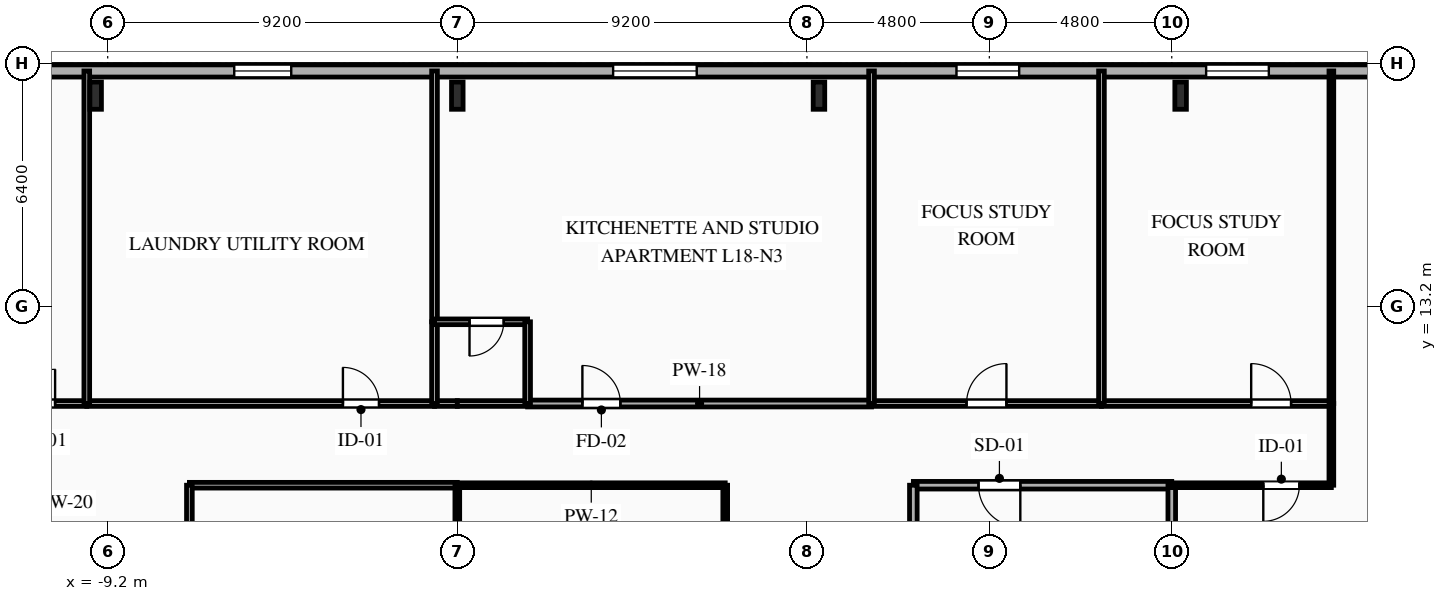
"""IFC4 building model, lengths in metres.
Left out: names, types, materials, properties, quantities, classifications, styles, units other than length and angle.
Written with IfcOpenShell. Run it as: python <this file> out.ifc"""

import sys

from ifc_helpers import new_model, si_unit, direction, frame, frame_2d, origin, origin_2d, place, context, subcontext, project, spatial, rectangle, i_section, extrude, element, fill, save


model = new_model("IFC4")
c1 = context("Model", 3, precision=1e-05, world=origin(), true_north=direction((0.0, 1.0)))
c2 = subcontext(c1, "Body", "Model", "MODEL_VIEW")
j1 = project(units=[si_unit("LENGTHUNIT", "METRE"), si_unit("PLANEANGLEUNIT", "RADIAN")], contexts=[c1])
p1 = place(None, origin())
s1 = spatial("IfcSite", under=j1, at=p1, CompositionType="ELEMENT")
p2 = place(p1, origin())
s2 = spatial("IfcBuilding", under=s1, at=p2, CompositionType="ELEMENT")
p3 = place(p2, frame((0.0, 0.0, 67.2)))
s3 = spatial("IfcBuildingStorey", under=s2, at=p3, CompositionType="ELEMENT", Elevation=67.2)
for number, where, z_axis, x_axis in (
    (1, (19.033, 18.75, 0.0), (0.0, 0.0, 1.0), (1.0, 0.0, 0.0)),
    (2, (9.517, 18.75, 0.0), (0.0, 0.0, 1.0), (1.0, 0.0, 0.0)),
    (3, (0.0, 18.75, 0.0), (0.0, 0.0, 1.0), (1.0, 0.0, 0.0)),
    (4, (-9.517, 18.75, 0.0), (0.0, 0.0, 1.0), (1.0, 0.0, 0.0)),
):
    element("IfcColumn", number, at=place(p3, frame(where, z_axis=z_axis, x_axis=x_axis)), inside=s3, PredefinedType="COLUMN", context=c2, shape_type="SweptSolid", body=[
        extrude(i_section(OverallWidth=0.304, OverallDepth=0.716, WebThickness=0.021, FlangeThickness=0.04, FilletRadius=0.027, at=origin_2d()), origin(), (0.0, 0.0, 1.0), 3.35),
    ])
p4 = place(p3, frame((-29.2, 19.4, 0.0), z_axis=(0.0, 0.0, 1.0), x_axis=(1.0, 0.0, 0.0)))
e5 = element("IfcWall", 5, at=p4, inside=s3, PredefinedType="SOLIDWALL", context=c2, shape_type="SweptSolid", body=[
    extrude(rectangle(XDim=58.4, YDim=0.32, at=frame_2d((29.2, 0.0))), origin(), (0.0, 0.0, 1.0), 3.035),
])
p5 = place(p4, frame((1.255, 0.0, 0.85)))
e6 = element("IfcOpeningElement", 6, at=p5, cuts=e5, PredefinedType="OPENING", context=c2, shape_type="SweptSolid", body=[
    extrude(rectangle(XDim=1.65, YDim=1.85, at=frame_2d((0.825, 0.925))), frame((0.0, 0.17, 0.0), z_axis=(0.0, -1.0, 0.0), x_axis=(1.0, 0.0, 0.0)), (0.0, 0.0, 1.0), 0.34),
])
p6 = place(p4, frame((4.26, 0.0, 0.85)))
e7 = element("IfcOpeningElement", 7, at=p6, cuts=e5, PredefinedType="OPENING", context=c2, shape_type="SweptSolid", body=[
    extrude(rectangle(XDim=1.4, YDim=1.85, at=frame_2d((0.7, 0.925))), frame((0.0, 0.17, 0.0), z_axis=(0.0, -1.0, 0.0), x_axis=(1.0, 0.0, 0.0)), (0.0, 0.0, 1.0), 0.34),
])
p7 = place(p4, frame((8.135, 0.0, 0.85)))
e8 = element("IfcOpeningElement", 8, at=p7, cuts=e5, PredefinedType="OPENING", context=c2, shape_type="SweptSolid", body=[
    extrude(rectangle(XDim=1.65, YDim=1.85, at=frame_2d((0.825, 0.925))), frame((0.0, 0.17, 0.0), z_axis=(0.0, -1.0, 0.0), x_axis=(1.0, 0.0, 0.0)), (0.0, 0.0, 1.0), 0.34),
])
p8 = place(p4, frame((13.575, 0.0, 0.85)))
e9 = element("IfcOpeningElement", 9, at=p8, cuts=e5, PredefinedType="OPENING", context=c2, shape_type="SweptSolid", body=[
    extrude(rectangle(XDim=1.65, YDim=1.85, at=frame_2d((0.825, 0.925))), frame((0.0, 0.17, 0.0), z_axis=(0.0, -1.0, 0.0), x_axis=(1.0, 0.0, 0.0)), (0.0, 0.0, 1.0), 0.34),
])
p9 = place(p4, frame((23.33, 0.0, 0.85)))
e10 = element("IfcOpeningElement", 10, at=p9, cuts=e5, PredefinedType="OPENING", context=c2, shape_type="SweptSolid", body=[
    extrude(rectangle(XDim=1.5, YDim=1.85, at=frame_2d((0.75, 0.925))), frame((0.0, 0.17, 0.0), z_axis=(0.0, -1.0, 0.0), x_axis=(1.0, 0.0, 0.0)), (0.0, 0.0, 1.0), 0.34),
])
p10 = place(p4, frame((33.3, 0.0, 0.85)))
e11 = element("IfcOpeningElement", 11, at=p10, cuts=e5, PredefinedType="OPENING", context=c2, shape_type="SweptSolid", body=[
    extrude(rectangle(XDim=2.2, YDim=1.85, at=frame_2d((1.1, 0.925))), frame((0.0, 0.17, 0.0), z_axis=(0.0, -1.0, 0.0), x_axis=(1.0, 0.0, 0.0)), (0.0, 0.0, 1.0), 0.34),
])
p11 = place(p4, frame((42.335, 0.0, 0.85)))
e12 = element("IfcOpeningElement", 12, at=p11, cuts=e5, PredefinedType="OPENING", context=c2, shape_type="SweptSolid", body=[
    extrude(rectangle(XDim=1.65, YDim=1.85, at=frame_2d((0.825, 0.925))), frame((0.0, 0.17, 0.0), z_axis=(0.0, -1.0, 0.0), x_axis=(1.0, 0.0, 0.0)), (0.0, 0.0, 1.0), 0.34),
])
p12 = place(p4, frame((48.905, 0.0, 0.85)))
e13 = element("IfcOpeningElement", 13, at=p12, cuts=e5, PredefinedType="OPENING", context=c2, shape_type="SweptSolid", body=[
    extrude(rectangle(XDim=1.65, YDim=1.85, at=frame_2d((0.825, 0.925))), frame((0.0, 0.17, 0.0), z_axis=(0.0, -1.0, 0.0), x_axis=(1.0, 0.0, 0.0)), (0.0, 0.0, 1.0), 0.34),
])
p13 = place(p4, frame((54.37, 0.0, 0.85)))
e14 = element("IfcOpeningElement", 14, at=p13, cuts=e5, PredefinedType="OPENING", context=c2, shape_type="SweptSolid", body=[
    extrude(rectangle(XDim=1.5, YDim=1.85, at=frame_2d((0.75, 0.925))), frame((0.0, 0.17, 0.0), z_axis=(0.0, -1.0, 0.0), x_axis=(1.0, 0.0, 0.0)), (0.0, 0.0, 1.0), 0.34),
])
p14 = place(p3, frame((18.8, 8.5, 0.0), z_axis=(0.0, 0.0, 1.0), x_axis=(-1.0, 0.0, 0.0)))
e15 = element("IfcWall", 15, at=p14, inside=s3, PredefinedType="PARTITIONING", context=c2, shape_type="SweptSolid", body=[
    extrude(rectangle(XDim=6.8, YDim=0.2, at=frame_2d((3.4, 0.0))), origin(), (0.0, 0.0, 1.0), 3.035),
])
p15 = place(p14, frame((3.985, 0.0, 0.0)))
e16 = element("IfcOpeningElement", 16, at=p15, cuts=e15, PredefinedType="OPENING", context=c2, shape_type="SweptSolid", body=[
    extrude(rectangle(XDim=1.1, YDim=2.15, at=frame_2d((0.55, 1.075))), frame((0.0, 0.11, 0.0), z_axis=(0.0, -1.0, 0.0), x_axis=(1.0, 0.0, 0.0)), (0.0, 0.0, 1.0), 0.22),
])
p16 = place(p3, frame((12.0, 8.5, 0.0), z_axis=(0.0, 0.0, 1.0), x_axis=(0.0, -1.0, 0.0)))
e17 = element("IfcWall", 17, at=p16, inside=s3, PredefinedType="PARTITIONING", context=c2, shape_type="SweptSolid", body=[
    extrude(rectangle(XDim=2.9, YDim=0.2, at=frame_2d((1.45, 0.0))), origin(), (0.0, 0.0, 1.0), 3.035),
])
p17 = place(p3, frame((18.8, 5.6, 0.0), z_axis=(0.0, 0.0, 1.0), x_axis=(0.0, 1.0, 0.0)))
e18 = element("IfcWall", 18, at=p17, inside=s3, PredefinedType="PARTITIONING", context=c2, shape_type="SweptSolid", body=[
    extrude(rectangle(XDim=2.9, YDim=0.2, at=frame_2d((1.45, 0.0))), origin(), (0.0, 0.0, 1.0), 2.52),
])
p18 = place(p3, frame((-12.1, 10.65, 0.0), z_axis=(0.0, 0.0, 1.0), x_axis=(1.0, 0.0, 0.0)))
e19 = element("IfcWall", 19, at=p18, inside=s3, PredefinedType="PLUMBINGWALL", context=c2, shape_type="SweptSolid", body=[
    extrude(rectangle(XDim=2.35, YDim=0.15, at=frame_2d((1.175, 0.0))), origin(), (0.0, 0.0, 1.0), 3.035),
])
p19 = place(p18, frame((0.616, 0.0, 0.0)))
e20 = element("IfcOpeningElement", 20, at=p19, cuts=e19, PredefinedType="OPENING", context=c2, shape_type="SweptSolid", body=[
    extrude(rectangle(XDim=0.9, YDim=2.1, at=frame_2d((0.45, 1.05))), frame((0.0, 0.085, 0.0), z_axis=(0.0, -1.0, 0.0), x_axis=(1.0, 0.0, 0.0)), (0.0, 0.0, 1.0), 0.17),
])
p20 = place(p3, frame((-9.75, 10.65, 0.0), z_axis=(0.0, 0.0, 1.0), x_axis=(1.0, 0.0, 0.0)))
e21 = element("IfcWall", 21, at=p20, inside=s3, PredefinedType="PARTITIONING", context=c2, shape_type="SweptSolid", body=[
    extrude(rectangle(XDim=9.15, YDim=0.15, at=frame_2d((4.575, 0.0))), origin(), (0.0, 0.0, 1.0), 3.035),
])
p21 = place(p20, frame((6.74, 0.0, 0.0)))
e22 = element("IfcOpeningElement", 22, at=p21, cuts=e21, PredefinedType="OPENING", context=c2, shape_type="SweptSolid", body=[
    extrude(rectangle(XDim=0.95, YDim=2.1, at=frame_2d((0.475, 1.05))), frame((0.0, 0.085, 0.0), z_axis=(0.0, -1.0, 0.0), x_axis=(1.0, 0.0, 0.0)), (0.0, 0.0, 1.0), 0.17),
])
p22 = place(p3, frame((-0.6, 10.65, 0.0), z_axis=(0.0, 0.0, 1.0), x_axis=(1.0, 0.0, 0.0)))
e23 = element("IfcWall", 23, at=p22, inside=s3, PredefinedType="PLUMBINGWALL", context=c2, shape_type="SweptSolid", body=[
    extrude(rectangle(XDim=0.6, YDim=0.15, at=frame_2d((0.3, 0.0))), origin(), (0.0, 0.0, 1.0), 3.035),
])
p23 = place(p3, frame((0.0, 8.5, 0.0), z_axis=(0.0, 0.0, 1.0), x_axis=(-1.0, 0.0, 0.0)))
e24 = element("IfcWall", 24, at=p23, inside=s3, PredefinedType="PARTITIONING", context=c2, shape_type="SweptSolid", body=[
    extrude(rectangle(XDim=7.05, YDim=0.15, at=frame_2d((3.525, 0.0))), origin(), (0.0, 0.0, 1.0), 3.035),
])
p24 = place(p3, frame((23.0, 8.5, 0.0), z_axis=(0.0, 0.0, 1.0), x_axis=(-1.0, 0.0, 0.0)))
e25 = element("IfcWall", 25, at=p24, inside=s3, PredefinedType="PARTITIONING", context=c2, shape_type="SweptSolid", body=[
    extrude(rectangle(XDim=4.2, YDim=0.125, at=frame_2d((2.1, 0.0))), origin(), (0.0, 0.0, 1.0), 3.035),
])
p25 = place(p24, frame((0.841, 0.0, 0.0)))
e26 = element("IfcOpeningElement", 26, at=p25, cuts=e25, PredefinedType="OPENING", context=c2, shape_type="SweptSolid", body=[
    extrude(rectangle(XDim=0.95, YDim=2.1, at=frame_2d((0.475, 1.05))), frame((0.0, 0.073, 0.0), z_axis=(0.0, -1.0, 0.0), x_axis=(1.0, 0.0, 0.0)), (0.0, 0.0, 1.0), 0.145),
])
p26 = place(p3, frame((23.0, 10.65, 0.0), z_axis=(0.0, 0.0, 1.0), x_axis=(0.0, -1.0, 0.0)))
e27 = element("IfcWall", 27, at=p26, inside=s3, PredefinedType="PARTITIONING", context=c2, shape_type="SweptSolid", body=[
    extrude(rectangle(XDim=2.15, YDim=0.125, at=frame_2d((1.075, 0.0))), origin(), (0.0, 0.0, 1.0), 3.035),
])
p27 = place(p3, frame((1.85, 10.65, 0.0), z_axis=(0.0, 0.0, 1.0), x_axis=(1.0, 0.0, 0.0)))
e28 = element("IfcWall", 28, at=p27, inside=s3, PredefinedType="PARTITIONING", context=c2, shape_type="SweptSolid", body=[
    extrude(rectangle(XDim=9.05, YDim=0.18, at=frame_2d((4.525, 0.0))), origin(), (0.0, 0.0, 1.0), 3.035),
])
p28 = place(p27, frame((1.441, 0.0, 0.0)))
e29 = element("IfcOpeningElement", 29, at=p28, cuts=e28, PredefinedType="OPENING", context=c2, shape_type="SweptSolid", body=[
    extrude(rectangle(XDim=1.0, YDim=2.15, at=frame_2d((0.5, 1.075))), frame((0.0, 0.1, 0.0), z_axis=(0.0, -1.0, 0.0), x_axis=(1.0, 0.0, 0.0)), (0.0, 0.0, 1.0), 0.2),
])
p29 = place(p3, frame((0.0, 10.65, 0.0), z_axis=(0.0, 0.0, 1.0), x_axis=(1.0, 0.0, 0.0)))
e30 = element("IfcWall", 30, at=p29, inside=s3, PredefinedType="PLUMBINGWALL", context=c2, shape_type="SweptSolid", body=[
    extrude(rectangle(XDim=1.85, YDim=0.15, at=frame_2d((0.925, 0.0))), origin(), (0.0, 0.0, 1.0), 3.035),
])
p30 = place(p3, frame((10.9, 10.65, 0.0), z_axis=(0.0, 0.0, 1.0), x_axis=(1.0, 0.0, 0.0)))
e31 = element("IfcWall", 31, at=p30, inside=s3, PredefinedType="PARTITIONING", context=c2, shape_type="SweptSolid", body=[
    extrude(rectangle(XDim=6.05, YDim=0.15, at=frame_2d((3.025, 0.0))), origin(), (0.0, 0.0, 1.0), 3.035),
])
p31 = place(p30, frame((2.5, 0.0, 0.0)))
e32 = element("IfcOpeningElement", 32, at=p31, cuts=e31, PredefinedType="OPENING", context=c2, shape_type="SweptSolid", body=[
    extrude(rectangle(XDim=1.05, YDim=2.15, at=frame_2d((0.525, 1.075))), frame((0.0, 0.085, 0.0), z_axis=(0.0, -1.0, 0.0), x_axis=(1.0, 0.0, 0.0)), (0.0, 0.0, 1.0), 0.17),
])
p32 = place(p3, frame((16.95, 10.65, 0.0), z_axis=(0.0, 0.0, 1.0), x_axis=(1.0, 0.0, 0.0)))
e33 = element("IfcWall", 33, at=p32, inside=s3, PredefinedType="PARTITIONING", context=c2, shape_type="SweptSolid", body=[
    extrude(rectangle(XDim=6.05, YDim=0.15, at=frame_2d((3.025, 0.0))), origin(), (0.0, 0.0, 1.0), 3.035),
])
p33 = place(p32, frame((3.94, 0.0, 0.0)))
e34 = element("IfcOpeningElement", 34, at=p33, cuts=e33, PredefinedType="OPENING", context=c2, shape_type="SweptSolid", body=[
    extrude(rectangle(XDim=1.05, YDim=2.15, at=frame_2d((0.525, 1.075))), frame((0.0, 0.085, 0.0), z_axis=(0.0, -1.0, 0.0), x_axis=(1.0, 0.0, 0.0)), (0.0, 0.0, 1.0), 0.17),
])
p34 = place(p3, frame((7.05, 8.5, 0.0), z_axis=(0.0, 0.0, 1.0), x_axis=(-1.0, 0.0, 0.0)))
e35 = element("IfcWall", 35, at=p34, inside=s3, PredefinedType="PARTITIONING", context=c2, shape_type="SweptSolid", body=[
    extrude(rectangle(XDim=7.05, YDim=0.125, at=frame_2d((3.525, 0.0))), origin(), (0.0, 0.0, 1.0), 3.035),
])
p35 = place(p3, frame((-7.05, 8.5, 0.0), z_axis=(0.0, 0.0, 1.0), x_axis=(0.0, -1.0, 0.0)))
e36 = element("IfcWall", 36, at=p35, inside=s3, PredefinedType="PARTITIONING", context=c2, shape_type="SweptSolid", body=[
    extrude(rectangle(XDim=14.1, YDim=0.15, at=frame_2d((7.05, 0.0))), origin(), (0.0, 0.0, 1.0), 3.035),
])
p36 = place(p35, frame((8.074, 0.0, 0.0)))
e37 = element("IfcOpeningElement", 37, at=p36, cuts=e36, PredefinedType="OPENING", context=c2, shape_type="SweptSolid", body=[
    extrude(rectangle(XDim=0.95, YDim=2.1, at=frame_2d((0.475, 1.05))), frame((0.0, 0.085, 0.0), z_axis=(0.0, -1.0, 0.0), x_axis=(1.0, 0.0, 0.0)), (0.0, 0.0, 1.0), 0.17),
])
p37 = place(p3, frame((7.05, -5.6, 0.0), z_axis=(0.0, 0.0, 1.0), x_axis=(0.0, 1.0, 0.0)))
e38 = element("IfcWall", 38, at=p37, inside=s3, PredefinedType="PARTITIONING", context=c2, shape_type="SweptSolid", body=[
    extrude(rectangle(XDim=14.1, YDim=0.125, at=frame_2d((7.05, 0.0))), origin(), (0.0, 0.0, 1.0), 3.035),
])
p38 = place(p37, frame((5.076, 0.0, 0.0)))
e39 = element("IfcOpeningElement", 39, at=p38, cuts=e38, PredefinedType="OPENING", context=c2, shape_type="SweptSolid", body=[
    extrude(rectangle(XDim=0.95, YDim=2.1, at=frame_2d((0.475, 1.05))), frame((0.0, 0.073, 0.0), z_axis=(0.0, -1.0, 0.0), x_axis=(1.0, 0.0, 0.0)), (0.0, 0.0, 1.0), 0.145),
])
p39 = place(p3, frame((23.0, 10.65, 0.0), z_axis=(0.0, 0.0, 1.0), x_axis=(0.0, 1.0, 0.0)))
e40 = element("IfcWall", 40, at=p39, inside=s3, PredefinedType="PARTITIONING", context=c2, shape_type="SweptSolid", body=[
    extrude(rectangle(XDim=8.75, YDim=0.125, at=frame_2d((4.375, 0.0))), origin(), (0.0, 0.0, 1.0), 3.035),
])
p40 = place(p3, frame((-9.75, 19.4, 0.0), z_axis=(0.0, 0.0, 1.0), x_axis=(0.0, -1.0, 0.0)))
e41 = element("IfcWall", 41, at=p40, inside=s3, PredefinedType="PLUMBINGWALL", context=c2, shape_type="SweptSolid", body=[
    extrude(rectangle(XDim=8.75, YDim=0.15, at=frame_2d((4.375, 0.0))), origin(), (0.0, 0.0, 1.0), 3.035),
])
p41 = place(p3, frame((-0.6, 19.4, 0.0), z_axis=(0.0, 0.0, 1.0), x_axis=(0.0, -1.0, 0.0)))
e42 = element("IfcWall", 42, at=p41, inside=s3, PredefinedType="PARTITIONING", context=c2, shape_type="SweptSolid", body=[
    extrude(rectangle(XDim=6.6, YDim=0.15, at=frame_2d((3.3, 0.0))), origin(), (0.0, 0.0, 1.0), 3.035),
])
p42 = place(p3, frame((-0.6, 12.8, 0.0), z_axis=(0.0, 0.0, 1.0), x_axis=(0.0, -1.0, 0.0)))
e43 = element("IfcWall", 43, at=p42, inside=s3, PredefinedType="PLUMBINGWALL", context=c2, shape_type="SweptSolid", body=[
    extrude(rectangle(XDim=2.15, YDim=0.15, at=frame_2d((1.075, 0.0))), origin(), (0.0, 0.0, 1.0), 3.035),
])
p43 = place(p3, frame((1.85, 12.8, 0.0), z_axis=(0.0, 0.0, 1.0), x_axis=(-1.0, 0.0, 0.0)))
e44 = element("IfcWall", 44, at=p43, inside=s3, PredefinedType="PLUMBINGWALL", context=c2, shape_type="SweptSolid", body=[
    extrude(rectangle(XDim=2.45, YDim=0.15, at=frame_2d((1.225, 0.0))), origin(), (0.0, 0.0, 1.0), 3.035),
])
p44 = place(p43, frame((0.629, 0.0, 0.0)))
e45 = element("IfcOpeningElement", 45, at=p44, cuts=e44, PredefinedType="OPENING", context=c2, shape_type="SweptSolid", body=[
    extrude(rectangle(XDim=0.9, YDim=2.1, at=frame_2d((0.45, 1.05))), frame((0.0, 0.085, 0.0), z_axis=(0.0, -1.0, 0.0), x_axis=(1.0, 0.0, 0.0)), (0.0, 0.0, 1.0), 0.17),
])
p45 = place(p3, frame((1.85, 10.65, 0.0), z_axis=(0.0, 0.0, 1.0), x_axis=(0.0, 1.0, 0.0)))
e46 = element("IfcWall", 46, at=p45, inside=s3, PredefinedType="PLUMBINGWALL", context=c2, shape_type="SweptSolid", body=[
    extrude(rectangle(XDim=2.15, YDim=0.15, at=frame_2d((1.075, 0.0))), origin(), (0.0, 0.0, 1.0), 3.035),
])
for number, where, z_axis, x_axis in (
    (47, (10.9, 19.4, 0.0), (0.0, 0.0, 1.0), (0.0, -1.0, 0.0)),
    (48, (16.95, 19.4, 0.0), (0.0, 0.0, 1.0), (0.0, -1.0, 0.0)),
):
    element("IfcWall", number, at=place(p3, frame(where, z_axis=z_axis, x_axis=x_axis)), inside=s3, PredefinedType="PARTITIONING", context=c2, shape_type="SweptSolid", body=[
        extrude(rectangle(XDim=8.75, YDim=0.15, at=frame_2d((4.375, 0.0))), origin(), (0.0, 0.0, 1.0), 3.035),
    ])
p46 = place(p3, frame((0.0, 8.5, 0.0), z_axis=(0.0, 0.0, 1.0), x_axis=(0.0, -1.0, 0.0)))
e49 = element("IfcWall", 49, at=p46, inside=s3, PredefinedType="PARTITIONING", context=c2, shape_type="SweptSolid", body=[
    extrude(rectangle(XDim=14.1, YDim=0.125, at=frame_2d((7.05, 0.0))), origin(), (0.0, 0.0, 1.0), 3.035),
])
p47 = place(p9, origin())
e50 = element("IfcWindow", 50, at=p47, inside=s3, PartitioningType="SINGLE_PANEL", PredefinedType="WINDOW", context=c2, shape_type="SweptSolid", body=[
    extrude(rectangle(XDim=1.5, YDim=1.85, at=frame_2d((0.75, 0.925))), frame((0.0, 0.03, 0.0), z_axis=(0.0, -1.0, 0.0), x_axis=(1.0, 0.0, 0.0)), (0.0, 0.0, 1.0), 0.06),
])
fill(e10, e50)
p48 = place(p10, origin())
e51 = element("IfcWindow", 51, at=p48, inside=s3, PartitioningType="SINGLE_PANEL", PredefinedType="WINDOW", context=c2, shape_type="SweptSolid", body=[
    extrude(rectangle(XDim=2.2, YDim=1.85, at=frame_2d((1.1, 0.925))), frame((0.0, 0.03, 0.0), z_axis=(0.0, -1.0, 0.0), x_axis=(1.0, 0.0, 0.0)), (0.0, 0.0, 1.0), 0.06),
])
fill(e11, e51)
p49 = place(p11, origin())
e52 = element("IfcWindow", 52, at=p49, inside=s3, PartitioningType="SINGLE_PANEL", PredefinedType="WINDOW", context=c2, shape_type="SweptSolid", body=[
    extrude(rectangle(XDim=1.65, YDim=1.85, at=frame_2d((0.825, 0.925))), frame((0.0, 0.03, 0.0), z_axis=(0.0, -1.0, 0.0), x_axis=(1.0, 0.0, 0.0)), (0.0, 0.0, 1.0), 0.06),
])
fill(e12, e52)
p50 = place(p12, origin())
e53 = element("IfcWindow", 53, at=p50, inside=s3, PartitioningType="SINGLE_PANEL", PredefinedType="WINDOW", context=c2, shape_type="SweptSolid", body=[
    extrude(rectangle(XDim=1.65, YDim=1.85, at=frame_2d((0.825, 0.925))), frame((0.0, 0.03, 0.0), z_axis=(0.0, -1.0, 0.0), x_axis=(1.0, 0.0, 0.0)), (0.0, 0.0, 1.0), 0.06),
])
fill(e13, e53)
p51 = place(p15, origin())
e54 = element("IfcDoor", 54, at=p51, inside=s3, OperationType="SINGLE_SWING_LEFT", PredefinedType="DOOR", context=c2, shape_type="SweptSolid", body=[
    extrude(rectangle(XDim=1.1, YDim=2.15, at=frame_2d((0.55, 1.075))), frame((0.0, 0.025, 0.0), z_axis=(0.0, -1.0, 0.0), x_axis=(1.0, 0.0, 0.0)), (0.0, 0.0, 1.0), 0.05),
])
fill(e16, e54)
p52 = place(p19, origin())
e55 = element("IfcDoor", 55, at=p52, inside=s3, OperationType="SINGLE_SWING_RIGHT", PredefinedType="DOOR", context=c2, shape_type="SweptSolid", body=[
    extrude(rectangle(XDim=0.9, YDim=2.1, at=frame_2d((0.45, 1.05))), frame((0.0, 0.025, 0.0), z_axis=(0.0, -1.0, 0.0), x_axis=(1.0, 0.0, 0.0)), (0.0, 0.0, 1.0), 0.05),
])
fill(e20, e55)
p53 = place(p21, origin())
e56 = element("IfcDoor", 56, at=p53, inside=s3, OperationType="SINGLE_SWING_LEFT", PredefinedType="DOOR", context=c2, shape_type="SweptSolid", body=[
    extrude(rectangle(XDim=0.95, YDim=2.1, at=frame_2d((0.475, 1.05))), frame((0.0, 0.025, 0.0), z_axis=(0.0, -1.0, 0.0), x_axis=(1.0, 0.0, 0.0)), (0.0, 0.0, 1.0), 0.05),
])
fill(e22, e56)
p54 = place(p25, origin())
e57 = element("IfcDoor", 57, at=p54, inside=s3, OperationType="SINGLE_SWING_RIGHT", PredefinedType="DOOR", context=c2, shape_type="SweptSolid", body=[
    extrude(rectangle(XDim=0.95, YDim=2.1, at=frame_2d((0.475, 1.05))), frame((0.0, 0.025, 0.0), z_axis=(0.0, -1.0, 0.0), x_axis=(1.0, 0.0, 0.0)), (0.0, 0.0, 1.0), 0.05),
])
fill(e26, e57)
p55 = place(p28, origin())
e58 = element("IfcDoor", 58, at=p55, inside=s3, OperationType="SINGLE_SWING_LEFT", PredefinedType="DOOR", context=c2, shape_type="SweptSolid", body=[
    extrude(rectangle(XDim=1.0, YDim=2.15, at=frame_2d((0.5, 1.075))), frame((0.0, 0.025, 0.0), z_axis=(0.0, -1.0, 0.0), x_axis=(1.0, 0.0, 0.0)), (0.0, 0.0, 1.0), 0.05),
])
fill(e29, e58)
p56 = place(p31, origin())
e59 = element("IfcDoor", 59, at=p56, inside=s3, OperationType="SINGLE_SWING_RIGHT", PredefinedType="DOOR", context=c2, shape_type="SweptSolid", body=[
    extrude(rectangle(XDim=1.05, YDim=2.15, at=frame_2d((0.525, 1.075))), frame((0.0, 0.025, 0.0), z_axis=(0.0, -1.0, 0.0), x_axis=(1.0, 0.0, 0.0)), (0.0, 0.0, 1.0), 0.05),
])
fill(e32, e59)
p57 = place(p33, origin())
e60 = element("IfcDoor", 60, at=p57, inside=s3, OperationType="SINGLE_SWING_LEFT", PredefinedType="DOOR", context=c2, shape_type="SweptSolid", body=[
    extrude(rectangle(XDim=1.05, YDim=2.15, at=frame_2d((0.525, 1.075))), frame((0.0, 0.025, 0.0), z_axis=(0.0, -1.0, 0.0), x_axis=(1.0, 0.0, 0.0)), (0.0, 0.0, 1.0), 0.05),
])
fill(e34, e60)
p58 = place(p44, origin())
e61 = element("IfcDoor", 61, at=p58, inside=s3, OperationType="SINGLE_SWING_RIGHT", PredefinedType="DOOR", context=c2, shape_type="SweptSolid", body=[
    extrude(rectangle(XDim=0.9, YDim=2.1, at=frame_2d((0.45, 1.05))), frame((0.0, 0.025, 0.0), z_axis=(0.0, -1.0, 0.0), x_axis=(1.0, 0.0, 0.0)), (0.0, 0.0, 1.0), 0.05),
])
fill(e45, e61)
save(model, sys.argv[1])
